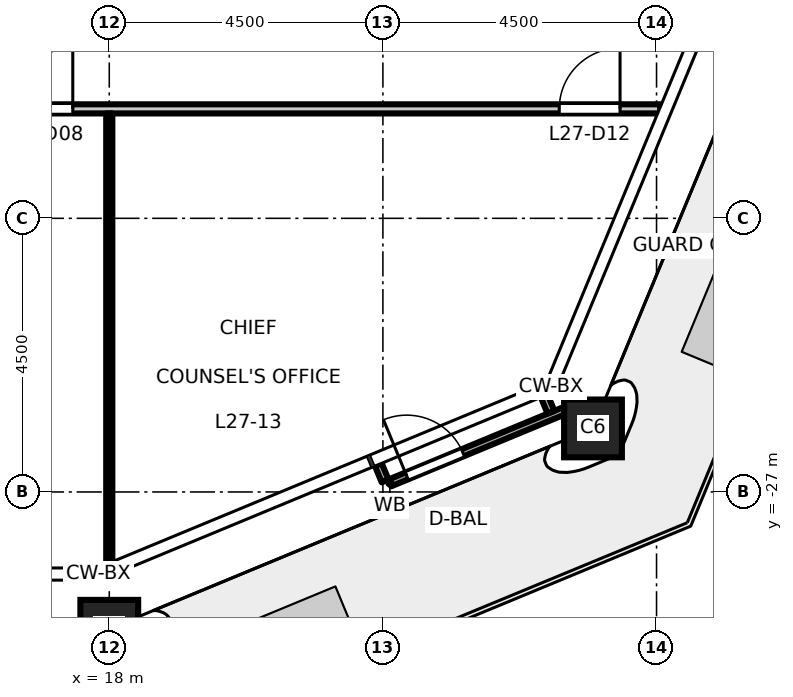
"""IFC4 building model, lengths in metres.
Left out: names, types, materials, properties, quantities, classifications, styles, units other than length and angle.
Written with IfcOpenShell. Run it as: python <this file> out.ifc"""

import sys

from ifc_helpers import new_model, si_unit, direction, frame, frame_2d, origin, origin_2d, place, context, subcontext, project, spatial, rectangle, hollow_rectangle, extrude, element, fill, save


model = new_model("IFC4")
c1 = context("Model", 3, precision=1e-05, world=origin(), true_north=direction((0.0, 1.0)))
c2 = subcontext(c1, "Body", "Model", "MODEL_VIEW")
j1 = project(units=[si_unit("LENGTHUNIT", "METRE"), si_unit("PLANEANGLEUNIT", "RADIAN")], contexts=[c1])
p1 = place(None, origin())
s1 = spatial("IfcSite", under=j1, at=p1, CompositionType="ELEMENT")
p2 = place(p1, origin())
s2 = spatial("IfcBuilding", under=s1, at=p2, CompositionType="ELEMENT")
p3 = place(p2, frame((0.0, 0.0, 127.2)))
s3 = spatial("IfcBuildingStorey", under=s2, at=p3, CompositionType="ELEMENT", Elevation=127.2)
for number, where, z_axis, x_axis in (
    (1, (18.0, -29.25, 0.0), (0.0, 0.0, 1.0), (1.0, 0.0, 0.0)),
    (2, (25.955, -25.955, 0.0), (0.0, 0.0, 1.0), (1.0, 0.0, 0.0)),
):
    element("IfcColumn", number, at=place(p3, frame(where, z_axis=z_axis, x_axis=x_axis)), inside=s3, PredefinedType="COLUMN", context=c2, shape_type="SweptSolid", body=[
        extrude(hollow_rectangle(XDim=0.95, YDim=0.95, WallThickness=0.055, at=origin_2d()), origin(), (0.0, 0.0, 1.0), 4.5),
    ])
for number, where, z_axis, x_axis in (
    (3, (22.425, -26.551, 0.0), (0.0, 0.0, 1.0), (0.382, -0.924, 0.0)),
    (4, (25.153, -25.421, 0.0), (0.0, 0.0, 1.0), (0.383, -0.924, 0.0)),
):
    element("IfcWall", number, at=place(p3, frame(where, z_axis=z_axis, x_axis=x_axis)), inside=s3, PredefinedType="STANDARD", context=c2, shape_type="SweptSolid", body=[
        extrude(rectangle(XDim=0.29, YDim=0.12, at=frame_2d((0.145, 0.0))), origin(), (0.0, 0.0, 1.0), 4.35),
    ])
p4 = place(p3, frame((22.615, -26.852, 0.0), z_axis=(0.0, 0.0, 1.0), x_axis=(0.923869084389, 0.382708655389, 0.0)))
e5 = element("IfcWall", 5, at=p4, inside=s3, PredefinedType="STANDARD", context=c2, shape_type="SweptSolid", body=[
    extrude(rectangle(XDim=3.102, YDim=0.12, at=frame_2d((1.551, 0.0))), origin(), (0.0, 0.0, 1.0), 4.35),
])
p5 = place(p4, frame((0.3, 0.0, 0.0)))
e6 = element("IfcOpeningElement", 6, at=p5, cuts=e5, PredefinedType="OPENING", context=c2, shape_type="SweptSolid", body=[
    extrude(rectangle(XDim=1.0, YDim=2.4, at=frame_2d((0.5, 1.2))), frame((0.0, 0.07, 0.0), z_axis=(0.0, -1.0, 0.0), x_axis=(1.0, 0.0, 0.0)), (0.0, 0.0, 1.0), 0.14),
])
p6 = place(p3, frame((-27.06, -20.7, 0.0), z_axis=(0.0, 0.0, 1.0), x_axis=(1.0, 0.0, 0.0)))
e7 = element("IfcWall", 7, at=p6, inside=s3, PredefinedType="PARTITIONING", context=c2, shape_type="SweptSolid", body=[
    extrude(rectangle(XDim=54.12, YDim=0.15, at=frame_2d((27.06, 0.0))), origin(), (0.0, 0.0, 1.0), 4.35),
])
p7 = place(p6, frame((9.71, 0.0, 0.0)))
e8 = element("IfcOpeningElement", 8, at=p7, cuts=e7, PredefinedType="OPENING", context=c2, shape_type="SweptSolid", body=[
    extrude(rectangle(XDim=1.0, YDim=2.1, at=frame_2d((0.5, 1.05))), frame((0.0, 0.085, 0.0), z_axis=(0.0, -1.0, 0.0), x_axis=(1.0, 0.0, 0.0)), (0.0, 0.0, 1.0), 0.17),
])
p8 = place(p6, frame((25.46, 0.0, 0.0)))
e9 = element("IfcOpeningElement", 9, at=p8, cuts=e7, PredefinedType="OPENING", context=c2, shape_type="SweptSolid", body=[
    extrude(rectangle(XDim=1.0, YDim=2.1, at=frame_2d((0.5, 1.05))), frame((0.0, 0.085, 0.0), z_axis=(0.0, -1.0, 0.0), x_axis=(1.0, 0.0, 0.0)), (0.0, 0.0, 1.0), 0.17),
])
p9 = place(p6, frame((27.71, 0.0, 0.0)))
e10 = element("IfcOpeningElement", 10, at=p9, cuts=e7, PredefinedType="OPENING", context=c2, shape_type="SweptSolid", body=[
    extrude(rectangle(XDim=1.0, YDim=2.1, at=frame_2d((0.5, 1.05))), frame((0.0, 0.085, 0.0), z_axis=(0.0, -1.0, 0.0), x_axis=(1.0, 0.0, 0.0)), (0.0, 0.0, 1.0), 0.17),
])
p10 = place(p6, frame((43.46, 0.0, 0.0)))
e11 = element("IfcOpeningElement", 11, at=p10, cuts=e7, PredefinedType="OPENING", context=c2, shape_type="SweptSolid", body=[
    extrude(rectangle(XDim=1.0, YDim=2.1, at=frame_2d((0.5, 1.05))), frame((0.0, 0.085, 0.0), z_axis=(0.0, -1.0, 0.0), x_axis=(1.0, 0.0, 0.0)), (0.0, 0.0, 1.0), 0.17),
])
p11 = place(p6, frame((0.65, 0.0, 0.0)))
e12 = element("IfcOpeningElement", 12, at=p11, cuts=e7, PredefinedType="OPENING", context=c2, shape_type="SweptSolid", body=[
    extrude(rectangle(XDim=1.0, YDim=2.1, at=frame_2d((0.5, 1.05))), frame((0.0, 0.085, 0.0), z_axis=(0.0, -1.0, 0.0), x_axis=(1.0, 0.0, 0.0)), (0.0, 0.0, 1.0), 0.17),
])
p12 = place(p6, frame((52.46, 0.0, 0.0)))
e13 = element("IfcOpeningElement", 13, at=p12, cuts=e7, PredefinedType="OPENING", context=c2, shape_type="SweptSolid", body=[
    extrude(rectangle(XDim=1.0, YDim=2.1, at=frame_2d((0.5, 1.05))), frame((0.0, 0.085, 0.0), z_axis=(0.0, -1.0, 0.0), x_axis=(1.0, 0.0, 0.0)), (0.0, 0.0, 1.0), 0.17),
])
p13 = place(p3, frame((18.0, -28.178, 0.0), z_axis=(0.0, 0.0, 1.0), x_axis=(0.0, 1.0, 0.0)))
e14 = element("IfcWall", 14, at=p13, inside=s3, PredefinedType="PARTITIONING", context=c2, shape_type="SweptSolid", body=[
    extrude(rectangle(XDim=7.403, YDim=0.1, at=frame_2d((3.702, 0.0))), origin(), (0.0, 0.0, 1.0), 3.45),
])
p14 = place(p5, origin())
e15 = element("IfcDoor", 15, at=p14, inside=s3, OperationType="SINGLE_SWING_LEFT", PredefinedType="DOOR", context=c2, shape_type="SweptSolid", body=[
    extrude(rectangle(XDim=1.0, YDim=2.4, at=frame_2d((0.5, 1.2))), frame((0.0, 0.025, 0.0), z_axis=(0.0, -1.0, 0.0), x_axis=(1.0, 0.0, 0.0)), (0.0, 0.0, 1.0), 0.05),
])
fill(e6, e15)
p15 = place(p10, origin())
e16 = element("IfcDoor", 16, at=p15, inside=s3, OperationType="SINGLE_SWING_RIGHT", PredefinedType="DOOR", context=c2, shape_type="SweptSolid", body=[
    extrude(rectangle(XDim=1.0, YDim=2.1, at=frame_2d((0.5, 1.05))), frame((0.0, 0.025, 0.0), z_axis=(0.0, -1.0, 0.0), x_axis=(1.0, 0.0, 0.0)), (0.0, 0.0, 1.0), 0.05),
])
fill(e11, e16)
p16 = place(p12, origin())
e17 = element("IfcDoor", 17, at=p16, inside=s3, OperationType="SINGLE_SWING_RIGHT", PredefinedType="DOOR", context=c2, shape_type="SweptSolid", body=[
    extrude(rectangle(XDim=1.0, YDim=2.1, at=frame_2d((0.5, 1.05))), frame((0.0, 0.025, 0.0), z_axis=(0.0, -1.0, 0.0), x_axis=(1.0, 0.0, 0.0)), (0.0, 0.0, 1.0), 0.05),
])
fill(e13, e17)
save(model, sys.argv[1])
